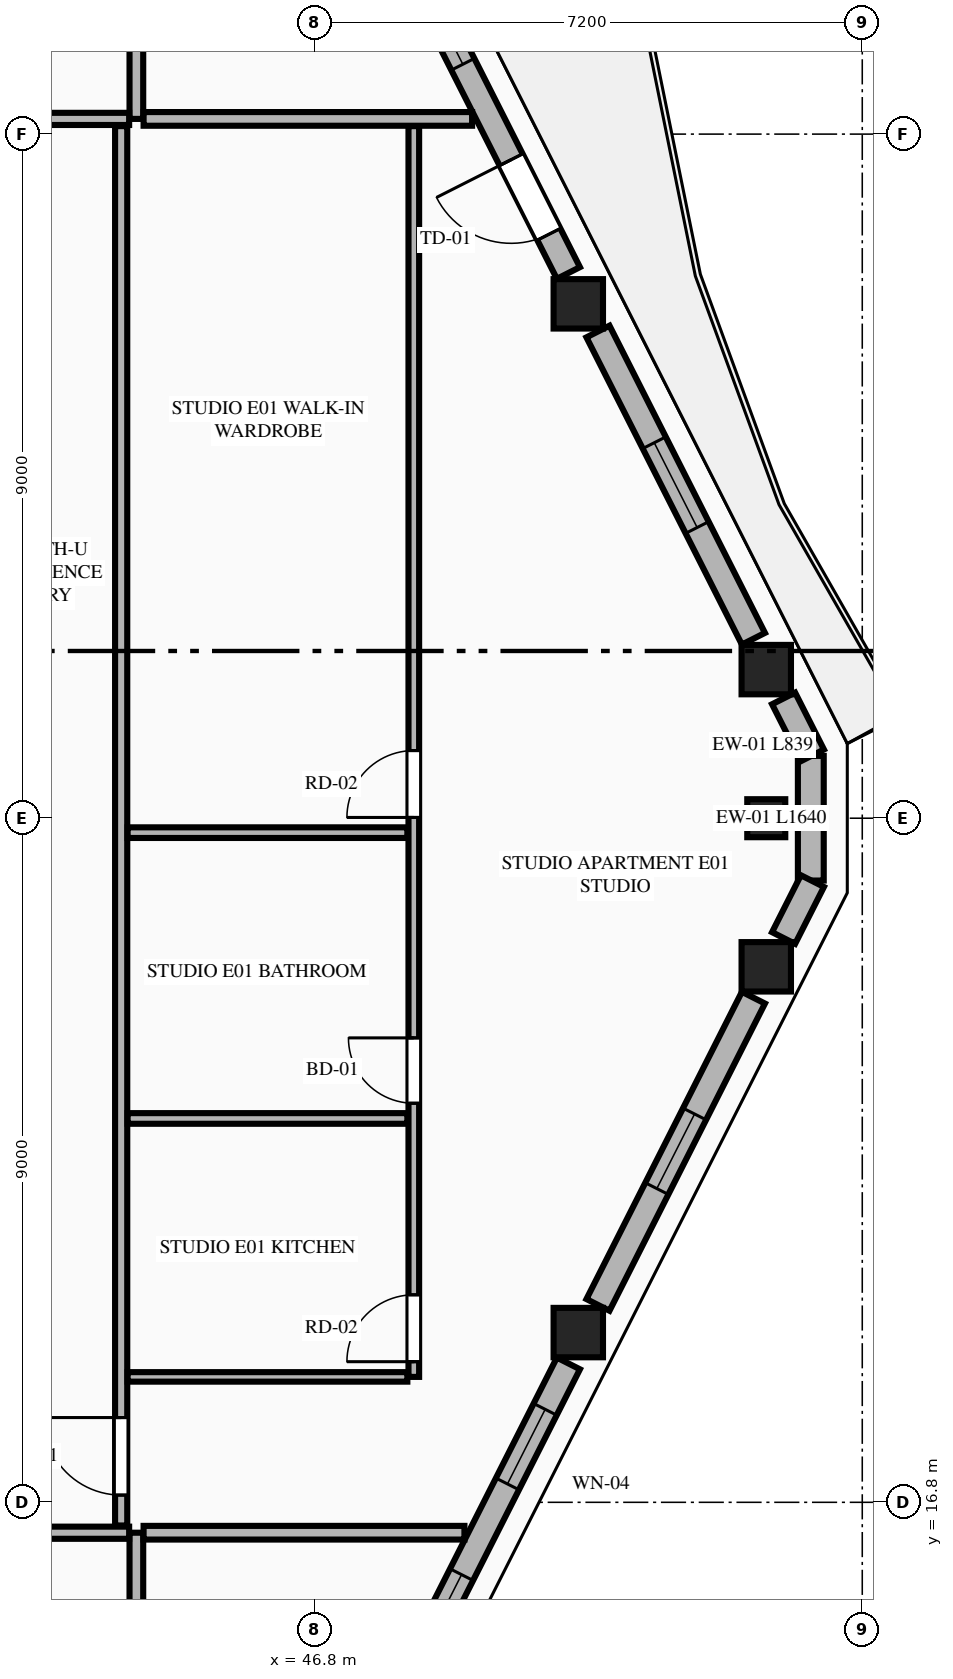
"""IFC4 building model, lengths in metres.
Left out: names, types, materials, properties, quantities, classifications, styles, units other than length and angle.
Written with IfcOpenShell. Run it as: python <this file> out.ifc"""

import sys

from ifc_helpers import new_model, si_unit, direction, frame, frame_2d, origin, origin_2d, place, context, subcontext, project, spatial, rectangle, extrude, element, fill, save


model = new_model("IFC4")
c1 = context("Model", 3, precision=1e-05, world=origin(), true_north=direction((0.0, 1.0)))
c2 = subcontext(c1, "Body", "Model", "MODEL_VIEW")
j1 = project(units=[si_unit("LENGTHUNIT", "METRE"), si_unit("PLANEANGLEUNIT", "RADIAN")], contexts=[c1])
p1 = place(None, origin())
s1 = spatial("IfcSite", under=j1, at=p1, CompositionType="ELEMENT")
p2 = place(p1, origin())
s2 = spatial("IfcBuilding", under=s1, at=p2, CompositionType="ELEMENT")
p3 = place(p2, frame((0.0, 0.0, 263.5)))
s3 = spatial("IfcBuildingStorey", under=s2, at=p3, CompositionType="ELEMENT", Elevation=263.5)
for number, where, z_axis, x_axis in (
    (1, (50.264, 19.033, 0.0), (0.0, 0.0, 1.0), (1.0, 0.0, 0.0)),
    (2, (52.737, 23.845, 0.0), (0.0, 0.0, 1.0), (1.0, 0.0, 0.0)),
    (3, (52.737, 27.755, 0.0), (0.0, 0.0, 1.0), (1.0, 0.0, 0.0)),
    (4, (50.264, 32.567, 0.0), (0.0, 0.0, 1.0), (1.0, 0.0, 0.0)),
):
    element("IfcColumn", number, at=place(p3, frame(where, z_axis=z_axis, x_axis=x_axis)), inside=s3, PredefinedType="COLUMN", context=c2, shape_type="SweptSolid", body=[
        extrude(rectangle(XDim=0.65, YDim=0.65, at=origin_2d()), origin(), (0.0, 0.0, 1.0), 3.65),
    ])
p4 = place(p3, frame((52.737, 25.8, 0.0), z_axis=(0.0, 0.0, 1.0), x_axis=(0.0, 1.0, 0.0)))
e5 = element("IfcColumn", 5, at=p4, inside=s3, PredefinedType="PILASTER", context=c2, shape_type="SweptSolid", body=[
    extrude(rectangle(XDim=0.5, YDim=0.35, at=origin_2d()), origin(), (0.0, 0.0, 1.0), 3.65),
])
p5 = place(p3, frame((53.323, 24.98, 0.0), z_axis=(0.0, 0.0, 1.0), x_axis=(0.0, 1.0, 0.0)))
e6 = element("IfcWall", 6, at=p5, inside=s3, PredefinedType="STANDARD", context=c2, shape_type="SweptSolid", body=[
    extrude(rectangle(XDim=1.64, YDim=0.34, at=frame_2d((0.82, 0.0))), origin(), (0.0, 0.0, 1.0), 3.45),
])
p6 = place(p3, frame((48.002, 14.413, 0.0), z_axis=(0.0, 0.0, 1.0), x_axis=(0.451468341582, 0.892287137949, 0.0)))
e7 = element("IfcWall", 7, at=p6, inside=s3, PredefinedType="STANDARD", context=c2, shape_type="SweptSolid", body=[
    extrude(rectangle(XDim=4.723, YDim=0.34, at=frame_2d((2.361, 0.0))), origin(), (0.0, 0.0, 1.0), 2.983),
])
p7 = place(p6, frame((0.359, 0.0, 0.75)))
e8 = element("IfcOpeningElement", 8, at=p7, cuts=e7, PredefinedType="OPENING", context=c2, shape_type="SweptSolid", body=[
    extrude(rectangle(XDim=1.25, YDim=1.95, at=frame_2d((0.625, 0.975))), frame((0.0, 0.18, 0.0), z_axis=(0.0, -1.0, 0.0), x_axis=(1.0, 0.0, 0.0)), (0.0, 0.0, 1.0), 0.36),
])
p8 = place(p6, frame((2.946, 0.0, 0.75)))
e9 = element("IfcOpeningElement", 9, at=p8, cuts=e7, PredefinedType="OPENING", context=c2, shape_type="SweptSolid", body=[
    extrude(rectangle(XDim=1.1, YDim=2.0, at=frame_2d((0.55, 1.0))), frame((0.0, 0.18, 0.0), z_axis=(0.0, -1.0, 0.0), x_axis=(1.0, 0.0, 0.0)), (0.0, 0.0, 1.0), 0.36),
])
p9 = place(p3, frame((50.523, 19.397, 0.0), z_axis=(0.0, 0.0, 1.0), x_axis=(0.45147697324, 0.892282770558, 0.0)))
e10 = element("IfcWall", 10, at=p9, inside=s3, PredefinedType="STANDARD", context=c2, shape_type="SweptSolid", body=[
    extrude(rectangle(XDim=4.53, YDim=0.34, at=frame_2d((2.265, 0.0))), origin(), (0.0, 0.0, 1.0), 2.983),
])
p10 = place(p9, frame((1.715, 0.0, 0.75)))
e11 = element("IfcOpeningElement", 11, at=p10, cuts=e10, PredefinedType="OPENING", context=c2, shape_type="SweptSolid", body=[
    extrude(rectangle(XDim=1.1, YDim=2.0, at=frame_2d((0.55, 1.0))), frame((0.0, 0.18, 0.0), z_axis=(0.0, -1.0, 0.0), x_axis=(1.0, 0.0, 0.0)), (0.0, 0.0, 1.0), 0.36),
])
p11 = place(p3, frame((52.965, 24.224, 0.0), z_axis=(0.0, 0.0, 1.0), x_axis=(0.4515140893, 0.892263989615, 0.0)))
e12 = element("IfcWall", 12, at=p11, inside=s3, PredefinedType="STANDARD", context=c2, shape_type="SweptSolid", body=[
    extrude(rectangle(XDim=0.839, YDim=0.34, at=frame_2d((0.419, 0.0))), origin(), (0.0, 0.0, 1.0), 3.45),
])
p12 = place(p3, frame((53.344, 26.627, 0.0), z_axis=(0.0, 0.0, 1.0), x_axis=(-0.45139691133, 0.892323275748, 0.0)))
e13 = element("IfcWall", 13, at=p12, inside=s3, PredefinedType="STANDARD", context=c2, shape_type="SweptSolid", body=[
    extrude(rectangle(XDim=0.839, YDim=0.34, at=frame_2d((0.42, 0.0))), origin(), (0.0, 0.0, 1.0), 3.45),
])
p13 = place(p3, frame((52.568, 28.161, 0.0), z_axis=(0.0, 0.0, 1.0), x_axis=(-0.45147697324, 0.892282770558, 0.0)))
e14 = element("IfcWall", 14, at=p13, inside=s3, PredefinedType="STANDARD", context=c2, shape_type="SweptSolid", body=[
    extrude(rectangle(XDim=4.53, YDim=0.34, at=frame_2d((2.265, 0.0))), origin(), (0.0, 0.0, 1.0), 2.983),
])
p14 = place(p13, frame((1.64, 0.0, 0.75)))
e15 = element("IfcOpeningElement", 15, at=p14, cuts=e14, PredefinedType="OPENING", context=c2, shape_type="SweptSolid", body=[
    extrude(rectangle(XDim=1.25, YDim=1.95, at=frame_2d((0.625, 0.975))), frame((0.0, 0.18, 0.0), z_axis=(0.0, -1.0, 0.0), x_axis=(1.0, 0.0, 0.0)), (0.0, 0.0, 1.0), 0.36),
])
p15 = place(p3, frame((50.134, 32.973, 0.0), z_axis=(0.0, 0.0, 1.0), x_axis=(-0.451447516904, 0.892297674255, 0.0)))
e16 = element("IfcWall", 16, at=p15, inside=s3, PredefinedType="STANDARD", context=c2, shape_type="SweptSolid", body=[
    extrude(rectangle(XDim=4.723, YDim=0.34, at=frame_2d((2.361, 0.0))), origin(), (0.0, 0.0, 1.0), 2.983),
])
p16 = place(p15, frame((0.57, 0.0, 0.0)))
e17 = element("IfcOpeningElement", 17, at=p16, cuts=e16, PredefinedType="OPENING", context=c2, shape_type="SweptSolid", body=[
    extrude(rectangle(XDim=1.1, YDim=2.25, at=frame_2d((0.55, 1.125))), frame((0.0, 0.18, 0.0), z_axis=(0.0, -1.0, 0.0), x_axis=(1.0, 0.0, 0.0)), (0.0, 0.0, 1.0), 0.36),
])
p17 = place(p15, frame((3.077, 0.0, 0.75)))
e18 = element("IfcOpeningElement", 18, at=p17, cuts=e16, PredefinedType="OPENING", context=c2, shape_type="SweptSolid", body=[
    extrude(rectangle(XDim=1.1, YDim=2.0, at=frame_2d((0.55, 1.0))), frame((0.0, 0.18, 0.0), z_axis=(0.0, -1.0, 0.0), x_axis=(1.0, 0.0, 0.0)), (0.0, 0.0, 1.0), 0.36),
])
p18 = place(p3, frame((44.45, 8.119, 0.0), z_axis=(0.0, 0.0, 1.0), x_axis=(0.0, 1.0, 0.0)))
e19 = element("IfcWall", 19, at=p18, inside=s3, PredefinedType="PARTITIONING", context=c2, shape_type="SweptSolid", body=[
    extrude(rectangle(XDim=8.281, YDim=0.18, at=frame_2d((4.141, 0.0))), origin(), (0.0, 0.0, 1.0), 3.45),
])
p19 = place(p3, frame((20.445, 16.4, 0.0), z_axis=(0.0, 0.0, 1.0), x_axis=(1.0, 0.0, 0.0)))
e20 = element("IfcWall", 20, at=p19, inside=s3, PredefinedType="PARTITIONING", context=c2, shape_type="SweptSolid", body=[
    extrude(rectangle(XDim=23.91, YDim=0.16, at=frame_2d((11.955, 0.0))), origin(), (0.0, 0.0, 1.0), 3.45),
])
p20 = place(p19, frame((0.705, 0.0, 0.0)))
e21 = element("IfcOpeningElement", 21, at=p20, cuts=e20, PredefinedType="OPENING", context=c2, shape_type="SweptSolid", body=[
    extrude(rectangle(XDim=1.02, YDim=2.25, at=frame_2d((0.51, 1.125))), frame((0.0, 0.09, 0.0), z_axis=(0.0, -1.0, 0.0), x_axis=(1.0, 0.0, 0.0)), (0.0, 0.0, 1.0), 0.18),
])
p21 = place(p3, frame((44.45, 35.0, 0.0), z_axis=(0.0, 0.0, 1.0), x_axis=(0.0, 1.0, 0.0)))
e22 = element("IfcWall", 22, at=p21, inside=s3, PredefinedType="PARTITIONING", context=c2, shape_type="SweptSolid", body=[
    extrude(rectangle(XDim=8.481, YDim=0.18, at=frame_2d((4.24, 0.0))), origin(), (0.0, 0.0, 1.0), 3.45),
])
p22 = place(p3, frame((20.445, 35.0, 0.0), z_axis=(0.0, 0.0, 1.0), x_axis=(1.0, 0.0, 0.0)))
e23 = element("IfcWall", 23, at=p22, inside=s3, PredefinedType="PARTITIONING", context=c2, shape_type="SweptSolid", body=[
    extrude(rectangle(XDim=23.91, YDim=0.16, at=frame_2d((11.955, 0.0))), origin(), (0.0, 0.0, 1.0), 3.45),
])
p23 = place(p22, frame((0.405, 0.0, 0.0)))
e24 = element("IfcOpeningElement", 24, at=p23, cuts=e23, PredefinedType="OPENING", context=c2, shape_type="SweptSolid", body=[
    extrude(rectangle(XDim=1.35, YDim=2.35, at=frame_2d((0.675, 1.175))), frame((0.0, 0.09, 0.0), z_axis=(0.0, -1.0, 0.0), x_axis=(1.0, 0.0, 0.0)), (0.0, 0.0, 1.0), 0.18),
])
p24 = place(p3, frame((44.545, 16.4, 0.0), z_axis=(0.0, 0.0, 1.0), x_axis=(1.0, 0.0, 0.0)))
e25 = element("IfcWall", 25, at=p24, inside=s3, PredefinedType="PARTITIONING", context=c2, shape_type="SweptSolid", body=[
    extrude(rectangle(XDim=4.221, YDim=0.18, at=frame_2d((2.111, 0.0))), origin(), (0.0, 0.0, 1.0), 3.45),
])
p25 = place(p3, frame((44.545, 35.0, 0.0), z_axis=(0.0, 0.0, 1.0), x_axis=(1.0, 0.0, 0.0)))
e26 = element("IfcWall", 26, at=p25, inside=s3, PredefinedType="PARTITIONING", context=c2, shape_type="SweptSolid", body=[
    extrude(rectangle(XDim=4.322, YDim=0.18, at=frame_2d((2.161, 0.0))), origin(), (0.0, 0.0, 1.0), 3.45),
])
p26 = place(p3, frame((44.25, 16.495, 0.0), z_axis=(0.0, 0.0, 1.0), x_axis=(0.0, 1.0, 0.0)))
e27 = element("IfcWall", 27, at=p26, inside=s3, PredefinedType="PARTITIONING", context=c2, shape_type="SweptSolid", body=[
    extrude(rectangle(XDim=18.41, YDim=0.16, at=frame_2d((9.205, 0.0))), origin(), (0.0, 0.0, 1.0), 3.137),
])
p27 = place(p26, frame((0.4, 0.0, 0.0)))
e28 = element("IfcOpeningElement", 28, at=p27, cuts=e27, PredefinedType="OPENING", context=c2, shape_type="SweptSolid", body=[
    extrude(rectangle(XDim=1.02, YDim=2.25, at=frame_2d((0.51, 1.125))), frame((0.0, 0.09, 0.0), z_axis=(0.0, -1.0, 0.0), x_axis=(1.0, 0.0, 0.0)), (0.0, 0.0, 1.0), 0.18),
])
p28 = place(p3, frame((44.335, 18.45, 0.0), z_axis=(0.0, 0.0, 1.0), x_axis=(1.0, 0.0, 0.0)))
e29 = element("IfcWall", 29, at=p28, inside=s3, PredefinedType="PARTITIONING", context=c2, shape_type="SweptSolid", body=[
    extrude(rectangle(XDim=3.68, YDim=0.125, at=frame_2d((1.84, 0.0))), origin(), (0.0, 0.0, 1.0), 3.45),
])
p29 = place(p3, frame((48.1, 18.45, 0.0), z_axis=(0.0, 0.0, 1.0), x_axis=(0.0, 1.0, 0.0)))
e30 = element("IfcWall", 30, at=p29, inside=s3, PredefinedType="PLUMBINGWALL", context=c2, shape_type="SweptSolid", body=[
    extrude(rectangle(XDim=16.455, YDim=0.14, at=frame_2d((8.228, 0.0))), origin(), (0.0, 0.0, 1.0), 3.45),
])
p30 = place(p29, frame((3.6, 0.0, 0.0)))
e31 = element("IfcOpeningElement", 31, at=p30, cuts=e30, PredefinedType="OPENING", context=c2, shape_type="SweptSolid", body=[
    extrude(rectangle(XDim=0.86, YDim=2.1, at=frame_2d((0.43, 1.05))), frame((0.0, 0.08, 0.0), z_axis=(0.0, -1.0, 0.0), x_axis=(1.0, 0.0, 0.0)), (0.0, 0.0, 1.0), 0.16),
])
p31 = place(p29, frame((7.36, 0.0, 0.0)))
e32 = element("IfcOpeningElement", 32, at=p31, cuts=e30, PredefinedType="OPENING", context=c2, shape_type="SweptSolid", body=[
    extrude(rectangle(XDim=0.88, YDim=2.15, at=frame_2d((0.44, 1.075))), frame((0.0, 0.08, 0.0), z_axis=(0.0, -1.0, 0.0), x_axis=(1.0, 0.0, 0.0)), (0.0, 0.0, 1.0), 0.16),
])
p32 = place(p29, frame((0.2, 0.0, 0.0)))
e33 = element("IfcOpeningElement", 33, at=p32, cuts=e30, PredefinedType="OPENING", context=c2, shape_type="SweptSolid", body=[
    extrude(rectangle(XDim=0.88, YDim=2.15, at=frame_2d((0.44, 1.075))), frame((0.0, 0.08, 0.0), z_axis=(0.0, -1.0, 0.0), x_axis=(1.0, 0.0, 0.0)), (0.0, 0.0, 1.0), 0.16),
])
for number, where, z_axis, x_axis in (
    (34, (44.335, 21.85, 0.0), (0.0, 0.0, 1.0), (1.0, 0.0, 0.0)),
    (35, (44.335, 25.61, 0.0), (0.0, 0.0, 1.0), (1.0, 0.0, 0.0)),
):
    element("IfcWall", number, at=place(p3, frame(where, z_axis=z_axis, x_axis=x_axis)), inside=s3, PredefinedType="PLUMBINGWALL", context=c2, shape_type="SweptSolid", body=[
        extrude(rectangle(XDim=3.68, YDim=0.14, at=frame_2d((1.84, 0.0))), origin(), (0.0, 0.0, 1.0), 3.45),
    ])
p33 = place(p7, origin())
e36 = element("IfcWindow", 36, at=p33, inside=s3, PartitioningType="SINGLE_PANEL", PredefinedType="WINDOW", context=c2, shape_type="SweptSolid", body=[
    extrude(rectangle(XDim=1.25, YDim=1.95, at=frame_2d((0.625, 0.975))), frame((0.0, 0.03, 0.0), z_axis=(0.0, -1.0, 0.0), x_axis=(1.0, 0.0, 0.0)), (0.0, 0.0, 1.0), 0.06),
])
fill(e8, e36)
p34 = place(p10, origin())
e37 = element("IfcWindow", 37, at=p34, inside=s3, PartitioningType="SINGLE_PANEL", PredefinedType="WINDOW", context=c2, shape_type="SweptSolid", body=[
    extrude(rectangle(XDim=1.1, YDim=2.0, at=frame_2d((0.55, 1.0))), frame((0.0, 0.03, 0.0), z_axis=(0.0, -1.0, 0.0), x_axis=(1.0, 0.0, 0.0)), (0.0, 0.0, 1.0), 0.06),
])
fill(e11, e37)
p35 = place(p14, origin())
e38 = element("IfcWindow", 38, at=p35, inside=s3, PartitioningType="SINGLE_PANEL", PredefinedType="WINDOW", context=c2, shape_type="SweptSolid", body=[
    extrude(rectangle(XDim=1.25, YDim=1.95, at=frame_2d((0.625, 0.975))), frame((0.0, 0.03, 0.0), z_axis=(0.0, -1.0, 0.0), x_axis=(1.0, 0.0, 0.0)), (0.0, 0.0, 1.0), 0.06),
])
fill(e15, e38)
p36 = place(p16, origin())
e39 = element("IfcDoor", 39, at=p36, inside=s3, OperationType="SINGLE_SWING_RIGHT", PredefinedType="DOOR", context=c2, shape_type="SweptSolid", body=[
    extrude(rectangle(XDim=1.1, YDim=2.25, at=frame_2d((0.55, 1.125))), frame((0.0, 0.025, 0.0), z_axis=(0.0, -1.0, 0.0), x_axis=(1.0, 0.0, 0.0)), (0.0, 0.0, 1.0), 0.05),
])
fill(e17, e39)
p37 = place(p30, origin())
e40 = element("IfcDoor", 40, at=p37, inside=s3, OperationType="SINGLE_SWING_RIGHT", PredefinedType="DOOR", context=c2, shape_type="SweptSolid", body=[
    extrude(rectangle(XDim=0.86, YDim=2.1, at=frame_2d((0.43, 1.05))), frame((0.0, 0.025, 0.0), z_axis=(0.0, -1.0, 0.0), x_axis=(1.0, 0.0, 0.0)), (0.0, 0.0, 1.0), 0.05),
])
fill(e31, e40)
p38 = place(p31, origin())
e41 = element("IfcDoor", 41, at=p38, inside=s3, OperationType="SINGLE_SWING_LEFT", PredefinedType="DOOR", context=c2, shape_type="SweptSolid", body=[
    extrude(rectangle(XDim=0.88, YDim=2.15, at=frame_2d((0.44, 1.075))), frame((0.0, 0.025, 0.0), z_axis=(0.0, -1.0, 0.0), x_axis=(1.0, 0.0, 0.0)), (0.0, 0.0, 1.0), 0.05),
])
fill(e32, e41)
p39 = place(p27, origin())
e42 = element("IfcDoor", 42, at=p39, inside=s3, OperationType="SINGLE_SWING_RIGHT", PredefinedType="DOOR", context=c2, shape_type="SweptSolid", body=[
    extrude(rectangle(XDim=1.02, YDim=2.25, at=frame_2d((0.51, 1.125))), frame((0.0, 0.025, 0.0), z_axis=(0.0, -1.0, 0.0), x_axis=(1.0, 0.0, 0.0)), (0.0, 0.0, 1.0), 0.05),
])
fill(e28, e42)
p40 = place(p32, origin())
e43 = element("IfcDoor", 43, at=p40, inside=s3, OperationType="SINGLE_SWING_LEFT", PredefinedType="DOOR", context=c2, shape_type="SweptSolid", body=[
    extrude(rectangle(XDim=0.88, YDim=2.15, at=frame_2d((0.44, 1.075))), frame((0.0, 0.025, 0.0), z_axis=(0.0, -1.0, 0.0), x_axis=(1.0, 0.0, 0.0)), (0.0, 0.0, 1.0), 0.05),
])
fill(e33, e43)
p41 = place(p8, origin())
e44 = element("IfcWindow", 44, at=p41, inside=s3, PartitioningType="SINGLE_PANEL", PredefinedType="WINDOW", context=c2, shape_type="SweptSolid", body=[
    extrude(rectangle(XDim=1.1, YDim=2.0, at=frame_2d((0.55, 1.0))), frame((0.0, 0.03, 0.0), z_axis=(0.0, -1.0, 0.0), x_axis=(1.0, 0.0, 0.0)), (0.0, 0.0, 1.0), 0.06),
])
fill(e9, e44)
p42 = place(p17, origin())
e45 = element("IfcWindow", 45, at=p42, inside=s3, PartitioningType="SINGLE_PANEL", PredefinedType="WINDOW", context=c2, shape_type="SweptSolid", body=[
    extrude(rectangle(XDim=1.1, YDim=2.0, at=frame_2d((0.55, 1.0))), frame((0.0, 0.03, 0.0), z_axis=(0.0, -1.0, 0.0), x_axis=(1.0, 0.0, 0.0)), (0.0, 0.0, 1.0), 0.06),
])
fill(e18, e45)
save(model, sys.argv[1])
